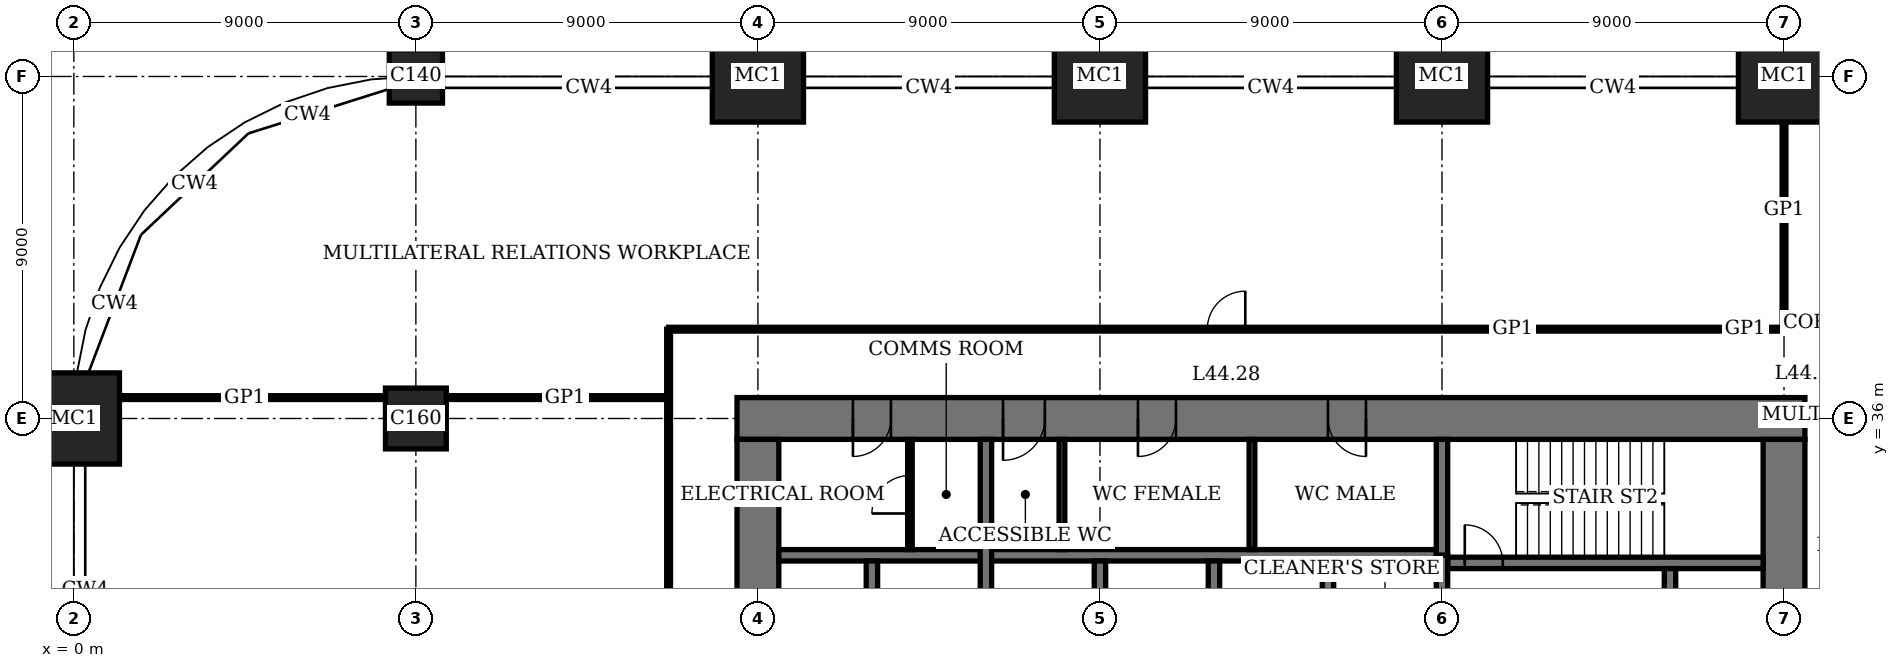
"""IFC4 building model, lengths in metres.
Left out: names, types, materials, properties, quantities, classifications, styles, units other than length and angle.
Written with IfcOpenShell. Run it as: python <this file> out.ifc"""

import sys

from ifc_helpers import new_model, si_unit, direction, frame, frame_2d, origin, origin_2d, place, context, subcontext, project, spatial, rectangle, extrude, element, fill, save


model = new_model("IFC4")
c1 = context("Model", 3, precision=1e-05, world=origin(), true_north=direction((0.0, 1.0)))
c2 = subcontext(c1, "Body", "Model", "MODEL_VIEW")
j1 = project(units=[si_unit("LENGTHUNIT", "METRE"), si_unit("PLANEANGLEUNIT", "RADIAN")], contexts=[c1])
p1 = place(None, origin())
s1 = spatial("IfcSite", under=j1, at=p1, CompositionType="ELEMENT")
p2 = place(p1, origin())
s2 = spatial("IfcBuilding", under=s1, at=p2, CompositionType="ELEMENT")
p3 = place(p2, frame((0.0, 0.0, 182.2)))
s3 = spatial("IfcBuildingStorey", under=s2, at=p3, CompositionType="ELEMENT", Elevation=182.2)
p4 = place(p3, frame((0.0, 36.0, 0.0), z_axis=(0.0, 0.0, 1.0), x_axis=(1.0, 0.0, 0.0)))
e1 = element("IfcColumn", 1, at=p4, inside=s3, PredefinedType="COLUMN", context=c2, shape_type="SweptSolid", body=[
    extrude(rectangle(XDim=2.4, YDim=2.4, at=origin_2d()), origin(), (0.0, 0.0, 1.0), 4.0),
])
p5 = place(p3, frame((9.0, 36.0, 0.0), z_axis=(0.0, 0.0, 1.0), x_axis=(1.0, 0.0, 0.0)))
e2 = element("IfcColumn", 2, at=p5, inside=s3, PredefinedType="COLUMN", context=c2, shape_type="SweptSolid", body=[
    extrude(rectangle(XDim=1.6, YDim=1.6, at=origin_2d()), origin(), (0.0, 0.0, 1.0), 4.0),
])
p6 = place(p3, frame((9.0, 45.0, 0.0), z_axis=(0.0, 0.0, 1.0), x_axis=(1.0, 0.0, 0.0)))
e3 = element("IfcColumn", 3, at=p6, inside=s3, PredefinedType="COLUMN", context=c2, shape_type="SweptSolid", body=[
    extrude(rectangle(XDim=1.4, YDim=1.4, at=origin_2d()), origin(), (0.0, 0.0, 1.0), 4.0),
])
for number, where, z_axis, x_axis in (
    (4, (18.0, 45.0, 0.0), (0.0, 0.0, 1.0), (1.0, 0.0, 0.0)),
    (5, (27.0, 45.0, 0.0), (0.0, 0.0, 1.0), (1.0, 0.0, 0.0)),
    (6, (36.0, 45.0, 0.0), (0.0, 0.0, 1.0), (1.0, 0.0, 0.0)),
    (7, (45.0, 45.0, 0.0), (0.0, 0.0, 1.0), (1.0, 0.0, 0.0)),
):
    element("IfcColumn", number, at=place(p3, frame(where, z_axis=z_axis, x_axis=x_axis)), inside=s3, PredefinedType="COLUMN", context=c2, shape_type="SweptSolid", body=[
        extrude(rectangle(XDim=2.4, YDim=2.4, at=origin_2d()), origin(), (0.0, 0.0, 1.0), 4.0),
    ])
p7 = place(p3, frame((45.55, 36.0, 0.0), z_axis=(0.0, 0.0, 1.0), x_axis=(-1.0, 0.0, 0.0)))
e8 = element("IfcWall", 8, at=p7, inside=s3, PredefinedType="SHEAR", context=c2, shape_type="SweptSolid", body=[
    extrude(rectangle(XDim=28.1, YDim=1.1, at=frame_2d((14.05, 0.0))), origin(), (0.0, 0.0, 1.0), 4.0),
])
p8 = place(p7, frame((11.55, 0.0, 0.0)))
e9 = element("IfcOpeningElement", 9, at=p8, cuts=e8, PredefinedType="OPENING", context=c2, shape_type="SweptSolid", body=[
    extrude(rectangle(XDim=1.0, YDim=2.4, at=frame_2d((0.5, 1.2))), frame((0.0, 0.56, 0.0), z_axis=(0.0, -1.0, 0.0), x_axis=(1.0, 0.0, 0.0)), (0.0, 0.0, 1.0), 1.12),
])
p9 = place(p7, frame((16.55, 0.0, 0.0)))
e10 = element("IfcOpeningElement", 10, at=p9, cuts=e8, PredefinedType="OPENING", context=c2, shape_type="SweptSolid", body=[
    extrude(rectangle(XDim=1.0, YDim=2.4, at=frame_2d((0.5, 1.2))), frame((0.0, 0.56, 0.0), z_axis=(0.0, -1.0, 0.0), x_axis=(1.0, 0.0, 0.0)), (0.0, 0.0, 1.0), 1.12),
])
p10 = place(p7, frame((20.0, 0.0, 0.0)))
e11 = element("IfcOpeningElement", 11, at=p10, cuts=e8, PredefinedType="OPENING", context=c2, shape_type="SweptSolid", body=[
    extrude(rectangle(XDim=1.1, YDim=2.4, at=frame_2d((0.55, 1.2))), frame((0.0, 0.56, 0.0), z_axis=(0.0, -1.0, 0.0), x_axis=(1.0, 0.0, 0.0)), (0.0, 0.0, 1.0), 1.12),
])
p11 = place(p7, frame((24.05, 0.0, 0.0)))
e12 = element("IfcOpeningElement", 12, at=p11, cuts=e8, PredefinedType="OPENING", context=c2, shape_type="SweptSolid", body=[
    extrude(rectangle(XDim=1.0, YDim=2.4, at=frame_2d((0.5, 1.2))), frame((0.0, 0.56, 0.0), z_axis=(0.0, -1.0, 0.0), x_axis=(1.0, 0.0, 0.0)), (0.0, 0.0, 1.0), 1.12),
])
p12 = place(p3, frame((18.0, 35.45, 0.0), z_axis=(0.0, 0.0, 1.0), x_axis=(0.0, -1.0, 0.0)))
e13 = element("IfcWall", 13, at=p12, inside=s3, PredefinedType="SHEAR", context=c2, shape_type="SweptSolid", body=[
    extrude(rectangle(XDim=16.9, YDim=1.1, at=frame_2d((8.45, 0.0))), origin(), (0.0, 0.0, 1.0), 4.0),
])
p13 = place(p12, frame((8.45, 0.0, 0.0)))
e14 = element("IfcOpeningElement", 14, at=p13, cuts=e13, PredefinedType="OPENING", context=c2, shape_type="SweptSolid", body=[
    extrude(rectangle(XDim=1.8, YDim=2.4, at=frame_2d((0.9, 1.2))), frame((0.0, 0.56, 0.0), z_axis=(0.0, -1.0, 0.0), x_axis=(1.0, 0.0, 0.0)), (0.0, 0.0, 1.0), 1.12),
])
p14 = place(p3, frame((45.0, 18.55, 0.0), z_axis=(0.0, 0.0, 1.0), x_axis=(0.0, 1.0, 0.0)))
e15 = element("IfcWall", 15, at=p14, inside=s3, PredefinedType="SHEAR", context=c2, shape_type="SweptSolid", body=[
    extrude(rectangle(XDim=16.9, YDim=1.1, at=frame_2d((8.45, 0.0))), origin(), (0.0, 0.0, 1.0), 4.0),
])
p15 = place(p14, frame((8.45, 0.0, 0.0)))
e16 = element("IfcOpeningElement", 16, at=p15, cuts=e15, PredefinedType="OPENING", context=c2, shape_type="SweptSolid", body=[
    extrude(rectangle(XDim=1.8, YDim=2.4, at=frame_2d((0.9, 1.2))), frame((0.0, 0.56, 0.0), z_axis=(0.0, -1.0, 0.0), x_axis=(1.0, 0.0, 0.0)), (0.0, 0.0, 1.0), 1.12),
])
p16 = place(p3, frame((36.15, 32.2, 0.0), z_axis=(0.0, 0.0, 1.0), x_axis=(1.0, 0.0, 0.0)))
e17 = element("IfcWall", 17, at=p16, inside=s3, PredefinedType="SHEAR", context=c2, shape_type="SweptSolid", body=[
    extrude(rectangle(XDim=8.3, YDim=0.3, at=frame_2d((4.15, 0.0))), origin(), (0.0, 0.0, 1.0), 4.0),
])
p17 = place(p16, frame((0.45, 0.0, 0.0)))
e18 = element("IfcOpeningElement", 18, at=p17, cuts=e17, PredefinedType="OPENING", context=c2, shape_type="SweptSolid", body=[
    extrude(rectangle(XDim=1.0, YDim=2.4, at=frame_2d((0.5, 1.2))), frame((0.0, 0.16, 0.0), z_axis=(0.0, -1.0, 0.0), x_axis=(1.0, 0.0, 0.0)), (0.0, 0.0, 1.0), 0.32),
])
p18 = place(p3, frame((36.0, 32.4, 0.0), z_axis=(0.0, 0.0, 1.0), x_axis=(0.0, 1.0, 0.0)))
e19 = element("IfcWall", 19, at=p18, inside=s3, PredefinedType="SHEAR", context=c2, shape_type="SweptSolid", body=[
    extrude(rectangle(XDim=3.05, YDim=0.3, at=frame_2d((1.525, 0.0))), origin(), (0.0, 0.0, 1.0), 4.0),
])
p19 = place(p3, frame((42.0, 29.55, 0.0), z_axis=(0.0, 0.0, 1.0), x_axis=(0.0, 1.0, 0.0)))
e20 = element("IfcWall", 20, at=p19, inside=s3, PredefinedType="SHEAR", context=c2, shape_type="SweptSolid", body=[
    extrude(rectangle(XDim=2.5, YDim=0.3, at=frame_2d((1.25, 0.0))), origin(), (0.0, 0.0, 1.0), 4.0),
])
p20 = place(p19, frame((0.7, 0.0, 0.0)))
e21 = element("IfcOpeningElement", 21, at=p20, cuts=e20, PredefinedType="OPENING", context=c2, shape_type="SweptSolid", body=[
    extrude(rectangle(XDim=1.1, YDim=2.4, at=frame_2d((0.55, 1.2))), frame((0.0, 0.16, 0.0), z_axis=(0.0, -1.0, 0.0), x_axis=(1.0, 0.0, 0.0)), (0.0, 0.0, 1.0), 0.32),
])
p21 = place(p3, frame((18.55, 32.4, 0.0), z_axis=(0.0, 0.0, 1.0), x_axis=(1.0, 0.0, 0.0)))
e22 = element("IfcWall", 22, at=p21, inside=s3, PredefinedType="SHEAR", context=c2, shape_type="SweptSolid", body=[
    extrude(rectangle(XDim=17.3, YDim=0.3, at=frame_2d((8.65, 0.0))), origin(), (0.0, 0.0, 1.0), 4.0),
])
for number, where, z_axis, x_axis in (
    (23, (33.0, 29.55, 0.0), (0.0, 0.0, 1.0), (0.0, 1.0, 0.0)),
    (24, (30.0, 29.55, 0.0), (0.0, 0.0, 1.0), (0.0, 1.0, 0.0)),
    (25, (27.0, 29.55, 0.0), (0.0, 0.0, 1.0), (0.0, 1.0, 0.0)),
):
    element("IfcWall", number, at=place(p3, frame(where, z_axis=z_axis, x_axis=x_axis)), inside=s3, PredefinedType="SHEAR", context=c2, shape_type="SweptSolid", body=[
        extrude(rectangle(XDim=2.7, YDim=0.3, at=frame_2d((1.35, 0.0))), origin(), (0.0, 0.0, 1.0), 4.0),
    ])
p22 = place(p3, frame((24.0, 29.55, 0.0), z_axis=(0.0, 0.0, 1.0), x_axis=(0.0, 1.0, 0.0)))
e26 = element("IfcWall", 26, at=p22, inside=s3, PredefinedType="SHEAR", context=c2, shape_type="SweptSolid", body=[
    extrude(rectangle(XDim=5.9, YDim=0.3, at=frame_2d((2.95, 0.0))), origin(), (0.0, 0.0, 1.0), 4.0),
])
p23 = place(p3, frame((21.0, 29.55, 0.0), z_axis=(0.0, 0.0, 1.0), x_axis=(0.0, 1.0, 0.0)))
e27 = element("IfcWall", 27, at=p23, inside=s3, PredefinedType="SHEAR", context=c2, shape_type="SweptSolid", body=[
    extrude(rectangle(XDim=2.7, YDim=0.3, at=frame_2d((1.35, 0.0))), origin(), (0.0, 0.0, 1.0), 4.0),
])
p24 = place(p3, frame((36.0, 29.55, 0.0), z_axis=(0.0, 0.0, 1.0), x_axis=(0.0, 1.0, 0.0)))
e28 = element("IfcWall", 28, at=p24, inside=s3, PredefinedType="SHEAR", context=c2, shape_type="SweptSolid", body=[
    extrude(rectangle(XDim=2.85, YDim=0.3, at=frame_2d((1.425, 0.0))), origin(), (0.0, 0.0, 1.0), 4.0),
])
p25 = place(p3, frame((1.2, 36.55, 0.0), z_axis=(0.0, 0.0, 1.0), x_axis=(1.0, 0.0, 0.0)))
e29 = element("IfcWall", 29, at=p25, inside=s3, PredefinedType="PARTITIONING", context=c2, shape_type="SweptSolid", body=[
    extrude(rectangle(XDim=7.0, YDim=0.1, at=frame_2d((3.5, 0.0))), origin(), (0.0, 0.0, 1.0), 3.75),
])
p26 = place(p3, frame((9.8, 36.55, 0.0), z_axis=(0.0, 0.0, 1.0), x_axis=(1.0, 0.0, 0.0)))
e30 = element("IfcWall", 30, at=p26, inside=s3, PredefinedType="PARTITIONING", context=c2, shape_type="SweptSolid", body=[
    extrude(rectangle(XDim=5.85, YDim=0.1, at=frame_2d((2.925, 0.0))), origin(), (0.0, 0.0, 1.0), 3.75),
])
p27 = place(p3, frame((15.65, 38.35, 0.0), z_axis=(0.0, 0.0, 1.0), x_axis=(1.0, 0.0, 0.0)))
e31 = element("IfcWall", 31, at=p27, inside=s3, PredefinedType="PARTITIONING", context=c2, shape_type="SweptSolid", body=[
    extrude(rectangle(XDim=29.35, YDim=0.1, at=frame_2d((14.675, 0.0))), origin(), (0.0, 0.0, 1.0), 3.75),
])
p28 = place(p27, frame((14.175, 0.0, 0.0)))
e32 = element("IfcOpeningElement", 32, at=p28, cuts=e31, PredefinedType="OPENING", context=c2, shape_type="SweptSolid", body=[
    extrude(rectangle(XDim=1.0, YDim=2.4, at=frame_2d((0.5, 1.2))), frame((0.0, 0.06, 0.0), z_axis=(0.0, -1.0, 0.0), x_axis=(1.0, 0.0, 0.0)), (0.0, 0.0, 1.0), 0.12),
])
p29 = place(p3, frame((45.0, 38.35, 0.0), z_axis=(0.0, 0.0, 1.0), x_axis=(1.0, 0.0, 0.0)))
e33 = element("IfcWall", 33, at=p29, inside=s3, PredefinedType="PARTITIONING", context=c2, shape_type="SweptSolid", body=[
    extrude(rectangle(XDim=2.35, YDim=0.1, at=frame_2d((1.175, 0.0))), origin(), (0.0, 0.0, 1.0), 3.75),
])
p30 = place(p3, frame((15.65, 27.0, 0.0), z_axis=(0.0, 0.0, 1.0), x_axis=(0.0, 1.0, 0.0)))
e34 = element("IfcWall", 34, at=p30, inside=s3, PredefinedType="PARTITIONING", context=c2, shape_type="SweptSolid", body=[
    extrude(rectangle(XDim=11.35, YDim=0.1, at=frame_2d((5.675, 0.0))), origin(), (0.0, 0.0, 1.0), 3.75),
])
p31 = place(p3, frame((45.0, 38.35, 0.0), z_axis=(0.0, 0.0, 1.0), x_axis=(0.0, 1.0, 0.0)))
e35 = element("IfcWall", 35, at=p31, inside=s3, PredefinedType="PARTITIONING", context=c2, shape_type="SweptSolid", body=[
    extrude(rectangle(XDim=5.45, YDim=0.1, at=frame_2d((2.725, 0.0))), origin(), (0.0, 0.0, 1.0), 3.05),
])
for number, where, z_axis, x_axis in (
    (36, (31.0, 32.55, 0.0), (0.0, 0.0, 1.0), (0.0, 1.0, 0.0)),
    (37, (26.0, 32.55, 0.0), (0.0, 0.0, 1.0), (0.0, 1.0, 0.0)),
):
    element("IfcWall", number, at=place(p3, frame(where, z_axis=z_axis, x_axis=x_axis)), inside=s3, PredefinedType="PARTITIONING", context=c2, shape_type="SweptSolid", body=[
        extrude(rectangle(XDim=2.9, YDim=0.15, at=frame_2d((1.45, 0.0))), origin(), (0.0, 0.0, 1.0), 3.75),
    ])
p32 = place(p3, frame((22.0, 32.55, 0.0), z_axis=(0.0, 0.0, 1.0), x_axis=(0.0, 1.0, 0.0)))
e38 = element("IfcWall", 38, at=p32, inside=s3, PredefinedType="PARTITIONING", context=c2, shape_type="SweptSolid", body=[
    extrude(rectangle(XDim=2.9, YDim=0.12, at=frame_2d((1.45, 0.0))), origin(), (0.0, 0.0, 1.0), 3.75),
])
p33 = place(p32, frame((0.95, 0.0, 0.0)))
e39 = element("IfcOpeningElement", 39, at=p33, cuts=e38, PredefinedType="OPENING", context=c2, shape_type="SweptSolid", body=[
    extrude(rectangle(XDim=1.0, YDim=2.4, at=frame_2d((0.5, 1.2))), frame((0.0, 0.07, 0.0), z_axis=(0.0, -1.0, 0.0), x_axis=(1.0, 0.0, 0.0)), (0.0, 0.0, 1.0), 0.14),
])
p34 = place(p8, origin())
e40 = element("IfcDoor", 40, at=p34, inside=s3, OperationType="SINGLE_SWING_RIGHT", PredefinedType="DOOR", context=c2, shape_type="SweptSolid", body=[
    extrude(rectangle(XDim=1.0, YDim=2.4, at=frame_2d((0.5, 1.2))), frame((0.0, 0.025, 0.0), z_axis=(0.0, -1.0, 0.0), x_axis=(1.0, 0.0, 0.0)), (0.0, 0.0, 1.0), 0.05),
    extrude(rectangle(XDim=0.04, YDim=2.4, at=frame_2d((0.02, 1.2))), frame((0.0, 0.4, 0.0), z_axis=(0.0, -1.0, 0.0), x_axis=(1.0, 0.0, 0.0)), (0.0, 0.0, 1.0), 0.8),
    extrude(rectangle(XDim=0.04, YDim=2.4, at=frame_2d((0.98, 1.2))), frame((0.0, 0.4, 0.0), z_axis=(0.0, -1.0, 0.0), x_axis=(1.0, 0.0, 0.0)), (0.0, 0.0, 1.0), 0.8),
    extrude(rectangle(XDim=1.0, YDim=0.04, at=frame_2d((0.5, 2.38))), frame((0.0, 0.4, 0.0), z_axis=(0.0, -1.0, 0.0), x_axis=(1.0, 0.0, 0.0)), (0.0, 0.0, 1.0), 0.8),
])
fill(e9, e40)
p35 = place(p9, origin())
e41 = element("IfcDoor", 41, at=p35, inside=s3, OperationType="SINGLE_SWING_LEFT", PredefinedType="DOOR", context=c2, shape_type="SweptSolid", body=[
    extrude(rectangle(XDim=1.0, YDim=2.4, at=frame_2d((0.5, 1.2))), frame((0.0, 0.025, 0.0), z_axis=(0.0, -1.0, 0.0), x_axis=(1.0, 0.0, 0.0)), (0.0, 0.0, 1.0), 0.05),
    extrude(rectangle(XDim=0.04, YDim=2.4, at=frame_2d((0.02, 1.2))), frame((0.0, 0.4, 0.0), z_axis=(0.0, -1.0, 0.0), x_axis=(1.0, 0.0, 0.0)), (0.0, 0.0, 1.0), 0.8),
    extrude(rectangle(XDim=0.04, YDim=2.4, at=frame_2d((0.98, 1.2))), frame((0.0, 0.4, 0.0), z_axis=(0.0, -1.0, 0.0), x_axis=(1.0, 0.0, 0.0)), (0.0, 0.0, 1.0), 0.8),
    extrude(rectangle(XDim=1.0, YDim=0.04, at=frame_2d((0.5, 2.38))), frame((0.0, 0.4, 0.0), z_axis=(0.0, -1.0, 0.0), x_axis=(1.0, 0.0, 0.0)), (0.0, 0.0, 1.0), 0.8),
])
fill(e10, e41)
p36 = place(p10, origin())
e42 = element("IfcDoor", 42, at=p36, inside=s3, OperationType="SINGLE_SWING_LEFT", PredefinedType="DOOR", context=c2, shape_type="SweptSolid", body=[
    extrude(rectangle(XDim=1.1, YDim=2.4, at=frame_2d((0.55, 1.2))), frame((0.0, 0.025, 0.0), z_axis=(0.0, -1.0, 0.0), x_axis=(1.0, 0.0, 0.0)), (0.0, 0.0, 1.0), 0.05),
    extrude(rectangle(XDim=0.04, YDim=2.4, at=frame_2d((0.02, 1.2))), frame((0.0, 0.44, 0.0), z_axis=(0.0, -1.0, 0.0), x_axis=(1.0, 0.0, 0.0)), (0.0, 0.0, 1.0), 0.88),
    extrude(rectangle(XDim=0.04, YDim=2.4, at=frame_2d((1.08, 1.2))), frame((0.0, 0.44, 0.0), z_axis=(0.0, -1.0, 0.0), x_axis=(1.0, 0.0, 0.0)), (0.0, 0.0, 1.0), 0.88),
    extrude(rectangle(XDim=1.1, YDim=0.04, at=frame_2d((0.55, 2.38))), frame((0.0, 0.44, 0.0), z_axis=(0.0, -1.0, 0.0), x_axis=(1.0, 0.0, 0.0)), (0.0, 0.0, 1.0), 0.88),
])
fill(e11, e42)
p37 = place(p11, origin())
e43 = element("IfcDoor", 43, at=p37, inside=s3, OperationType="SINGLE_SWING_LEFT", PredefinedType="DOOR", context=c2, shape_type="SweptSolid", body=[
    extrude(rectangle(XDim=1.0, YDim=2.4, at=frame_2d((0.5, 1.2))), frame((0.0, 0.025, 0.0), z_axis=(0.0, -1.0, 0.0), x_axis=(1.0, 0.0, 0.0)), (0.0, 0.0, 1.0), 0.05),
    extrude(rectangle(XDim=0.04, YDim=2.4, at=frame_2d((0.02, 1.2))), frame((0.0, 0.4, 0.0), z_axis=(0.0, -1.0, 0.0), x_axis=(1.0, 0.0, 0.0)), (0.0, 0.0, 1.0), 0.8),
    extrude(rectangle(XDim=0.04, YDim=2.4, at=frame_2d((0.98, 1.2))), frame((0.0, 0.4, 0.0), z_axis=(0.0, -1.0, 0.0), x_axis=(1.0, 0.0, 0.0)), (0.0, 0.0, 1.0), 0.8),
    extrude(rectangle(XDim=1.0, YDim=0.04, at=frame_2d((0.5, 2.38))), frame((0.0, 0.4, 0.0), z_axis=(0.0, -1.0, 0.0), x_axis=(1.0, 0.0, 0.0)), (0.0, 0.0, 1.0), 0.8),
])
fill(e12, e43)
p38 = place(p17, origin())
e44 = element("IfcDoor", 44, at=p38, inside=s3, OperationType="SINGLE_SWING_RIGHT", PredefinedType="DOOR", context=c2, shape_type="SweptSolid", body=[
    extrude(rectangle(XDim=1.0, YDim=2.4, at=frame_2d((0.5, 1.2))), frame((0.0, 0.03, 0.0), z_axis=(0.0, -1.0, 0.0), x_axis=(1.0, 0.0, 0.0)), (0.0, 0.0, 1.0), 0.06),
])
fill(e18, e44)
p39 = place(p28, origin())
e45 = element("IfcDoor", 45, at=p39, inside=s3, OperationType="SINGLE_SWING_LEFT", PredefinedType="DOOR", context=c2, shape_type="SweptSolid", body=[
    extrude(rectangle(XDim=1.0, YDim=2.4, at=frame_2d((0.5, 1.2))), frame((0.0, 0.02, 0.0), z_axis=(0.0, -1.0, 0.0), x_axis=(1.0, 0.0, 0.0)), (0.0, 0.0, 1.0), 0.04),
])
fill(e32, e45)
p40 = place(p33, origin())
e46 = element("IfcDoor", 46, at=p40, inside=s3, OperationType="SINGLE_SWING_RIGHT", PredefinedType="DOOR", context=c2, shape_type="SweptSolid", body=[
    extrude(rectangle(XDim=1.0, YDim=2.4, at=frame_2d((0.5, 1.2))), frame((0.0, 0.03, 0.0), z_axis=(0.0, -1.0, 0.0), x_axis=(1.0, 0.0, 0.0)), (0.0, 0.0, 1.0), 0.06),
])
fill(e39, e46)
save(model, sys.argv[1])
